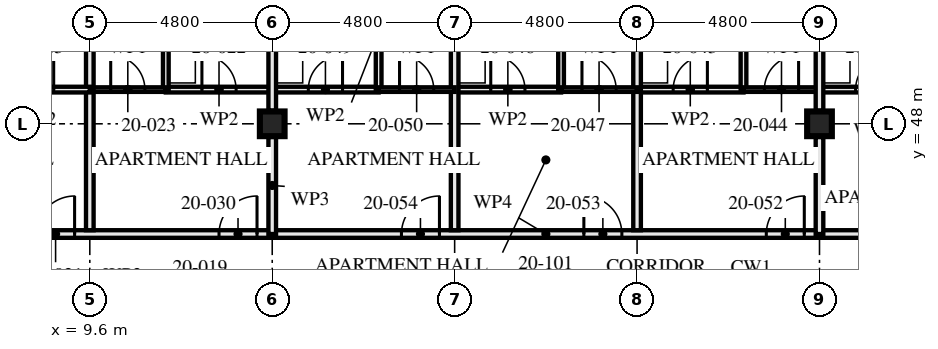
"""IFC4 building model, lengths in metres.
Left out: names, types, materials, properties, quantities, classifications, styles, units other than length and angle.
Written with IfcOpenShell. Run it as: python <this file> out.ifc"""

import sys

from ifc_helpers import new_model, si_unit, direction, frame, frame_2d, origin, origin_2d, place, context, subcontext, project, spatial, rectangle, hollow_rectangle, extrude, element, fill, save


model = new_model("IFC4")
c1 = context("Model", 3, precision=1e-05, world=origin(), true_north=direction((0.0, 1.0)))
c2 = subcontext(c1, "Body", "Model", "MODEL_VIEW")
j1 = project(units=[si_unit("LENGTHUNIT", "METRE"), si_unit("PLANEANGLEUNIT", "RADIAN")], contexts=[c1])
p1 = place(None, origin())
s1 = spatial("IfcSite", under=j1, at=p1, CompositionType="ELEMENT")
p2 = place(p1, origin())
s2 = spatial("IfcBuilding", under=s1, at=p2, CompositionType="ELEMENT")
p3 = place(p2, frame((0.0, 0.0, 76.0)))
s3 = spatial("IfcBuildingStorey", under=s2, at=p3, CompositionType="ELEMENT", Elevation=76.0)
for number, where, z_axis, x_axis in (
    (1, (14.4, 48.0, 0.0), (0.0, 0.0, 1.0), (1.0, 0.0, 0.0)),
    (2, (28.8, 48.0, 0.0), (0.0, 0.0, 1.0), (1.0, 0.0, 0.0)),
):
    element("IfcColumn", number, at=place(p3, frame(where, z_axis=z_axis, x_axis=x_axis)), inside=s3, PredefinedType="COLUMN", context=c2, shape_type="SweptSolid", body=[
        extrude(hollow_rectangle(XDim=0.65, YDim=0.65, WallThickness=0.05, at=origin_2d()), origin(), (0.0, 0.0, 1.0), 3.5),
    ])
p4 = place(p3, frame((11.6, 51.9, 0.0), z_axis=(0.0, 0.0, 1.0), x_axis=(0.0, -1.0, 0.0)))
e3 = element("IfcWall", 3, at=p4, inside=s3, PredefinedType="PARTITIONING", context=c2, shape_type="SweptSolid", body=[
    extrude(rectangle(XDim=3.0, YDim=0.15, at=frame_2d((1.5, 0.0))), origin(), (0.0, 0.0, 1.0), 3.25),
])
p5 = place(p3, frame((14.4, 48.9, 0.0), z_axis=(0.0, 0.0, 1.0), x_axis=(-1.0, 0.0, 0.0)))
e4 = element("IfcWall", 4, at=p5, inside=s3, PredefinedType="PARTITIONING", context=c2, shape_type="SweptSolid", body=[
    extrude(rectangle(XDim=2.8, YDim=0.15, at=frame_2d((1.4, 0.0))), origin(), (0.0, 0.0, 1.0), 3.25),
])
p6 = place(p5, frame((0.95, 0.0, 0.0)))
e5 = element("IfcOpeningElement", 5, at=p6, cuts=e4, PredefinedType="OPENING", context=c2, shape_type="SweptSolid", body=[
    extrude(rectangle(XDim=0.9, YDim=2.1, at=frame_2d((0.45, 1.05))), frame((0.0, 0.085, 0.0), z_axis=(0.0, -1.0, 0.0), x_axis=(1.0, 0.0, 0.0)), (0.0, 0.0, 1.0), 0.171),
])
p7 = place(p3, frame((11.6, 48.9, 0.0), z_axis=(0.0, 0.0, 1.0), x_axis=(-1.0, 0.0, 0.0)))
e6 = element("IfcWall", 6, at=p7, inside=s3, PredefinedType="PARTITIONING", context=c2, shape_type="SweptSolid", body=[
    extrude(rectangle(XDim=2.0, YDim=0.12, at=frame_2d((1.0, 0.0))), origin(), (0.0, 0.0, 1.0), 3.25),
])
p8 = place(p7, frame((0.55, 0.0, 0.0)))
e7 = element("IfcOpeningElement", 7, at=p8, cuts=e6, PredefinedType="OPENING", context=c2, shape_type="SweptSolid", body=[
    extrude(rectangle(XDim=0.9, YDim=2.1, at=frame_2d((0.45, 1.05))), frame((0.0, 0.071, 0.0), z_axis=(0.0, -1.0, 0.0), x_axis=(1.0, 0.0, 0.0)), (0.0, 0.0, 1.0), 0.141),
])
p9 = place(p3, frame((9.6, 57.28, 0.0), z_axis=(0.0, 0.0, 1.0), x_axis=(0.0, -1.0, 0.0)))
e8 = element("IfcWall", 8, at=p9, inside=s3, PredefinedType="PARTITIONING", context=c2, shape_type="SweptSolid", body=[
    extrude(rectangle(XDim=12.08, YDim=0.2, at=frame_2d((6.04, 0.0))), origin(), (0.0, 0.0, 1.0), 2.04),
])
p10 = place(p3, frame((9.6, 48.9, 0.0), z_axis=(0.0, 0.0, 1.0), x_axis=(-1.0, 0.0, 0.0)))
e9 = element("IfcWall", 9, at=p10, inside=s3, PredefinedType="PARTITIONING", context=c2, shape_type="SweptSolid", body=[
    extrude(rectangle(XDim=2.8, YDim=0.15, at=frame_2d((1.4, 0.0))), origin(), (0.0, 0.0, 1.0), 3.25),
])
p11 = place(p10, frame((0.95, 0.0, 0.0)))
e10 = element("IfcOpeningElement", 10, at=p11, cuts=e9, PredefinedType="OPENING", context=c2, shape_type="SweptSolid", body=[
    extrude(rectangle(XDim=0.9, YDim=2.1, at=frame_2d((0.45, 1.05))), frame((0.0, 0.085, 0.0), z_axis=(0.0, -1.0, 0.0), x_axis=(1.0, 0.0, 0.0)), (0.0, 0.0, 1.0), 0.171),
])
p12 = place(p3, frame((14.4, 45.1, 0.0), z_axis=(0.0, 0.0, 1.0), x_axis=(-1.0, 0.0, 0.0)))
e11 = element("IfcWall", 11, at=p12, inside=s3, PredefinedType="PARTITIONING", context=c2, shape_type="SweptSolid", body=[
    extrude(rectangle(XDim=9.6, YDim=0.2, at=frame_2d((4.8, 0.0))), origin(), (0.0, 0.0, 1.0), 3.25),
])
p13 = place(p12, frame((0.4, 0.0, 0.0)))
e12 = element("IfcOpeningElement", 12, at=p13, cuts=e11, PredefinedType="OPENING", context=c2, shape_type="SweptSolid", body=[
    extrude(rectangle(XDim=1.0, YDim=2.1, at=frame_2d((0.5, 1.05))), frame((0.0, 0.111, 0.0), z_axis=(0.0, -1.0, 0.0), x_axis=(1.0, 0.0, 0.0)), (0.0, 0.0, 1.0), 0.221),
])
p14 = place(p12, frame((5.2, 0.0, 0.0)))
e13 = element("IfcOpeningElement", 13, at=p14, cuts=e11, PredefinedType="OPENING", context=c2, shape_type="SweptSolid", body=[
    extrude(rectangle(XDim=1.0, YDim=2.1, at=frame_2d((0.5, 1.05))), frame((0.0, 0.111, 0.0), z_axis=(0.0, -1.0, 0.0), x_axis=(1.0, 0.0, 0.0)), (0.0, 0.0, 1.0), 0.221),
])
p15 = place(p3, frame((26.8, 51.9, 0.0), z_axis=(0.0, 0.0, 1.0), x_axis=(0.0, -1.0, 0.0)))
e14 = element("IfcWall", 14, at=p15, inside=s3, PredefinedType="PARTITIONING", context=c2, shape_type="SweptSolid", body=[
    extrude(rectangle(XDim=3.0, YDim=0.15, at=frame_2d((1.5, 0.0))), origin(), (0.0, 0.0, 1.0), 3.25),
])
p16 = place(p3, frame((26.8, 48.9, 0.0), z_axis=(0.0, 0.0, 1.0), x_axis=(-1.0, 0.0, 0.0)))
e15 = element("IfcWall", 15, at=p16, inside=s3, PredefinedType="PARTITIONING", context=c2, shape_type="SweptSolid", body=[
    extrude(rectangle(XDim=2.8, YDim=0.15, at=frame_2d((1.4, 0.0))), origin(), (0.0, 0.0, 1.0), 3.25),
])
p17 = place(p16, frame((0.95, 0.0, 0.0)))
e16 = element("IfcOpeningElement", 16, at=p17, cuts=e15, PredefinedType="OPENING", context=c2, shape_type="SweptSolid", body=[
    extrude(rectangle(XDim=0.9, YDim=2.1, at=frame_2d((0.45, 1.05))), frame((0.0, 0.085, 0.0), z_axis=(0.0, -1.0, 0.0), x_axis=(1.0, 0.0, 0.0)), (0.0, 0.0, 1.0), 0.171),
])
p18 = place(p3, frame((28.8, 48.9, 0.0), z_axis=(0.0, 0.0, 1.0), x_axis=(-1.0, 0.0, 0.0)))
e17 = element("IfcWall", 17, at=p18, inside=s3, PredefinedType="PARTITIONING", context=c2, shape_type="SweptSolid", body=[
    extrude(rectangle(XDim=2.0, YDim=0.12, at=frame_2d((1.0, 0.0))), origin(), (0.0, 0.0, 1.0), 3.25),
])
p19 = place(p18, frame((0.55, 0.0, 0.0)))
e18 = element("IfcOpeningElement", 18, at=p19, cuts=e17, PredefinedType="OPENING", context=c2, shape_type="SweptSolid", body=[
    extrude(rectangle(XDim=0.9, YDim=2.1, at=frame_2d((0.45, 1.05))), frame((0.0, 0.071, 0.0), z_axis=(0.0, -1.0, 0.0), x_axis=(1.0, 0.0, 0.0)), (0.0, 0.0, 1.0), 0.141),
])
p20 = place(p3, frame((24.0, 57.28, 0.0), z_axis=(0.0, 0.0, 1.0), x_axis=(0.0, -1.0, 0.0)))
e19 = element("IfcWall", 19, at=p20, inside=s3, PredefinedType="PARTITIONING", context=c2, shape_type="SweptSolid", body=[
    extrude(rectangle(XDim=12.08, YDim=0.2, at=frame_2d((6.04, 0.0))), origin(), (0.0, 0.0, 1.0), 2.04),
])
p21 = place(p3, frame((22.0, 51.9, 0.0), z_axis=(0.0, 0.0, 1.0), x_axis=(0.0, -1.0, 0.0)))
e20 = element("IfcWall", 20, at=p21, inside=s3, PredefinedType="PARTITIONING", context=c2, shape_type="SweptSolid", body=[
    extrude(rectangle(XDim=3.0, YDim=0.15, at=frame_2d((1.5, 0.0))), origin(), (0.0, 0.0, 1.0), 3.25),
])
p22 = place(p3, frame((22.0, 48.9, 0.0), z_axis=(0.0, 0.0, 1.0), x_axis=(-1.0, 0.0, 0.0)))
e21 = element("IfcWall", 21, at=p22, inside=s3, PredefinedType="PARTITIONING", context=c2, shape_type="SweptSolid", body=[
    extrude(rectangle(XDim=2.8, YDim=0.15, at=frame_2d((1.4, 0.0))), origin(), (0.0, 0.0, 1.0), 3.25),
])
p23 = place(p22, frame((0.95, 0.0, 0.0)))
e22 = element("IfcOpeningElement", 22, at=p23, cuts=e21, PredefinedType="OPENING", context=c2, shape_type="SweptSolid", body=[
    extrude(rectangle(XDim=0.9, YDim=2.1, at=frame_2d((0.45, 1.05))), frame((0.0, 0.085, 0.0), z_axis=(0.0, -1.0, 0.0), x_axis=(1.0, 0.0, 0.0)), (0.0, 0.0, 1.0), 0.171),
])
p24 = place(p3, frame((24.0, 48.9, 0.0), z_axis=(0.0, 0.0, 1.0), x_axis=(-1.0, 0.0, 0.0)))
e23 = element("IfcWall", 23, at=p24, inside=s3, PredefinedType="PARTITIONING", context=c2, shape_type="SweptSolid", body=[
    extrude(rectangle(XDim=2.0, YDim=0.12, at=frame_2d((1.0, 0.0))), origin(), (0.0, 0.0, 1.0), 3.25),
])
p25 = place(p24, frame((0.55, 0.0, 0.0)))
e24 = element("IfcOpeningElement", 24, at=p25, cuts=e23, PredefinedType="OPENING", context=c2, shape_type="SweptSolid", body=[
    extrude(rectangle(XDim=0.9, YDim=2.1, at=frame_2d((0.45, 1.05))), frame((0.0, 0.071, 0.0), z_axis=(0.0, -1.0, 0.0), x_axis=(1.0, 0.0, 0.0)), (0.0, 0.0, 1.0), 0.141),
])
p26 = place(p3, frame((19.2, 57.28, 0.0), z_axis=(0.0, 0.0, 1.0), x_axis=(0.0, -1.0, 0.0)))
e25 = element("IfcWall", 25, at=p26, inside=s3, PredefinedType="PARTITIONING", context=c2, shape_type="SweptSolid", body=[
    extrude(rectangle(XDim=12.08, YDim=0.2, at=frame_2d((6.04, 0.0))), origin(), (0.0, 0.0, 1.0), 2.04),
])
p27 = place(p3, frame((17.2, 51.9, 0.0), z_axis=(0.0, 0.0, 1.0), x_axis=(0.0, -1.0, 0.0)))
e26 = element("IfcWall", 26, at=p27, inside=s3, PredefinedType="PARTITIONING", context=c2, shape_type="SweptSolid", body=[
    extrude(rectangle(XDim=3.0, YDim=0.15, at=frame_2d((1.5, 0.0))), origin(), (0.0, 0.0, 1.0), 3.25),
])
p28 = place(p3, frame((17.2, 48.9, 0.0), z_axis=(0.0, 0.0, 1.0), x_axis=(-1.0, 0.0, 0.0)))
e27 = element("IfcWall", 27, at=p28, inside=s3, PredefinedType="PARTITIONING", context=c2, shape_type="SweptSolid", body=[
    extrude(rectangle(XDim=2.8, YDim=0.15, at=frame_2d((1.4, 0.0))), origin(), (0.0, 0.0, 1.0), 3.25),
])
p29 = place(p28, frame((0.95, 0.0, 0.0)))
e28 = element("IfcOpeningElement", 28, at=p29, cuts=e27, PredefinedType="OPENING", context=c2, shape_type="SweptSolid", body=[
    extrude(rectangle(XDim=0.9, YDim=2.1, at=frame_2d((0.45, 1.05))), frame((0.0, 0.085, 0.0), z_axis=(0.0, -1.0, 0.0), x_axis=(1.0, 0.0, 0.0)), (0.0, 0.0, 1.0), 0.171),
])
p30 = place(p3, frame((19.2, 48.9, 0.0), z_axis=(0.0, 0.0, 1.0), x_axis=(-1.0, 0.0, 0.0)))
e29 = element("IfcWall", 29, at=p30, inside=s3, PredefinedType="PARTITIONING", context=c2, shape_type="SweptSolid", body=[
    extrude(rectangle(XDim=2.0, YDim=0.12, at=frame_2d((1.0, 0.0))), origin(), (0.0, 0.0, 1.0), 3.25),
])
p31 = place(p30, frame((0.55, 0.0, 0.0)))
e30 = element("IfcOpeningElement", 30, at=p31, cuts=e29, PredefinedType="OPENING", context=c2, shape_type="SweptSolid", body=[
    extrude(rectangle(XDim=0.9, YDim=2.1, at=frame_2d((0.45, 1.05))), frame((0.0, 0.071, 0.0), z_axis=(0.0, -1.0, 0.0), x_axis=(1.0, 0.0, 0.0)), (0.0, 0.0, 1.0), 0.141),
])
p32 = place(p3, frame((28.8, 45.1, 0.0), z_axis=(0.0, 0.0, 1.0), x_axis=(-1.0, 0.0, 0.0)))
e31 = element("IfcWall", 31, at=p32, inside=s3, PredefinedType="PARTITIONING", context=c2, shape_type="SweptSolid", body=[
    extrude(rectangle(XDim=14.4, YDim=0.2, at=frame_2d((7.2, 0.0))), origin(), (0.0, 0.0, 1.0), 3.25),
])
p33 = place(p32, frame((0.4, 0.0, 0.0)))
e32 = element("IfcOpeningElement", 32, at=p33, cuts=e31, PredefinedType="OPENING", context=c2, shape_type="SweptSolid", body=[
    extrude(rectangle(XDim=1.0, YDim=2.1, at=frame_2d((0.5, 1.05))), frame((0.0, 0.111, 0.0), z_axis=(0.0, -1.0, 0.0), x_axis=(1.0, 0.0, 0.0)), (0.0, 0.0, 1.0), 0.221),
])
p34 = place(p32, frame((5.2, 0.0, 0.0)))
e33 = element("IfcOpeningElement", 33, at=p34, cuts=e31, PredefinedType="OPENING", context=c2, shape_type="SweptSolid", body=[
    extrude(rectangle(XDim=1.0, YDim=2.1, at=frame_2d((0.5, 1.05))), frame((0.0, 0.111, 0.0), z_axis=(0.0, -1.0, 0.0), x_axis=(1.0, 0.0, 0.0)), (0.0, 0.0, 1.0), 0.221),
])
p35 = place(p32, frame((10.0, 0.0, 0.0)))
e34 = element("IfcOpeningElement", 34, at=p35, cuts=e31, PredefinedType="OPENING", context=c2, shape_type="SweptSolid", body=[
    extrude(rectangle(XDim=1.0, YDim=2.1, at=frame_2d((0.5, 1.05))), frame((0.0, 0.111, 0.0), z_axis=(0.0, -1.0, 0.0), x_axis=(1.0, 0.0, 0.0)), (0.0, 0.0, 1.0), 0.221),
])
p36 = place(p3, frame((31.6, 48.9, 0.0), z_axis=(0.0, 0.0, 1.0), x_axis=(-1.0, 0.0, 0.0)))
e35 = element("IfcWall", 35, at=p36, inside=s3, PredefinedType="PARTITIONING", context=c2, shape_type="SweptSolid", body=[
    extrude(rectangle(XDim=2.8, YDim=0.15, at=frame_2d((1.4, 0.0))), origin(), (0.0, 0.0, 1.0), 3.25),
])
p37 = place(p36, frame((0.95, 0.0, 0.0)))
e36 = element("IfcOpeningElement", 36, at=p37, cuts=e35, PredefinedType="OPENING", context=c2, shape_type="SweptSolid", body=[
    extrude(rectangle(XDim=0.9, YDim=2.1, at=frame_2d((0.45, 1.05))), frame((0.0, 0.085, 0.0), z_axis=(0.0, -1.0, 0.0), x_axis=(1.0, 0.0, 0.0)), (0.0, 0.0, 1.0), 0.171),
])
p38 = place(p3, frame((38.4, 45.1, 0.0), z_axis=(0.0, 0.0, 1.0), x_axis=(-1.0, 0.0, 0.0)))
e37 = element("IfcWall", 37, at=p38, inside=s3, PredefinedType="PARTITIONING", context=c2, shape_type="SweptSolid", body=[
    extrude(rectangle(XDim=9.6, YDim=0.2, at=frame_2d((4.8, 0.0))), origin(), (0.0, 0.0, 1.0), 3.25),
])
p39 = place(p38, frame((0.4, 0.0, 0.0)))
e38 = element("IfcOpeningElement", 38, at=p39, cuts=e37, PredefinedType="OPENING", context=c2, shape_type="SweptSolid", body=[
    extrude(rectangle(XDim=1.0, YDim=2.1, at=frame_2d((0.5, 1.05))), frame((0.0, 0.111, 0.0), z_axis=(0.0, -1.0, 0.0), x_axis=(1.0, 0.0, 0.0)), (0.0, 0.0, 1.0), 0.221),
])
p40 = place(p38, frame((5.2, 0.0, 0.0)))
e39 = element("IfcOpeningElement", 39, at=p40, cuts=e37, PredefinedType="OPENING", context=c2, shape_type="SweptSolid", body=[
    extrude(rectangle(XDim=1.0, YDim=2.1, at=frame_2d((0.5, 1.05))), frame((0.0, 0.111, 0.0), z_axis=(0.0, -1.0, 0.0), x_axis=(1.0, 0.0, 0.0)), (0.0, 0.0, 1.0), 0.221),
])
p41 = place(p3, frame((14.4, 45.1, 0.0), z_axis=(0.0, 0.0, 1.0), x_axis=(0.0, 1.0, 0.0)))
e40 = element("IfcWall", 40, at=p41, inside=s3, PredefinedType="PARTITIONING", context=c2, shape_type="SweptSolid", body=[
    extrude(rectangle(XDim=2.555, YDim=0.2, at=frame_2d((1.277, 0.0))), origin(), (0.0, 0.0, 1.0), 2.04),
])
p42 = place(p3, frame((14.4, 48.345, 0.0), z_axis=(0.0, 0.0, 1.0), x_axis=(0.0, 1.0, 0.0)))
e41 = element("IfcWall", 41, at=p42, inside=s3, PredefinedType="PARTITIONING", context=c2, shape_type="SweptSolid", body=[
    extrude(rectangle(XDim=4.11, YDim=0.2, at=frame_2d((2.055, 0.0))), origin(), (0.0, 0.0, 1.0), 2.04),
])
p43 = place(p3, frame((28.8, 45.1, 0.0), z_axis=(0.0, 0.0, 1.0), x_axis=(0.0, 1.0, 0.0)))
e42 = element("IfcWall", 42, at=p43, inside=s3, PredefinedType="PARTITIONING", context=c2, shape_type="SweptSolid", body=[
    extrude(rectangle(XDim=2.555, YDim=0.2, at=frame_2d((1.277, 0.0))), origin(), (0.0, 0.0, 1.0), 2.04),
])
p44 = place(p3, frame((28.8, 48.345, 0.0), z_axis=(0.0, 0.0, 1.0), x_axis=(0.0, 1.0, 0.0)))
e43 = element("IfcWall", 43, at=p44, inside=s3, PredefinedType="PARTITIONING", context=c2, shape_type="SweptSolid", body=[
    extrude(rectangle(XDim=4.11, YDim=0.2, at=frame_2d((2.055, 0.0))), origin(), (0.0, 0.0, 1.0), 2.04),
])
p45 = place(p6, frame((0.9, 0.0, 0.0), z_axis=(0.0, 0.0, 1.0), x_axis=(-1.0, 0.0, 0.0)))
e44 = element("IfcDoor", 44, at=p45, inside=s3, OperationType="SINGLE_SWING_RIGHT", PredefinedType="DOOR", context=c2, shape_type="SweptSolid", body=[
    extrude(rectangle(XDim=0.9, YDim=2.1, at=frame_2d((0.45, 1.05))), frame((0.0, 0.022, 0.0), z_axis=(0.0, -1.0, 0.0), x_axis=(1.0, 0.0, 0.0)), (0.0, 0.0, 1.0), 0.044),
])
fill(e5, e44)
p46 = place(p8, frame((0.9, 0.0, 0.0), z_axis=(0.0, 0.0, 1.0), x_axis=(-1.0, 0.0, 0.0)))
e45 = element("IfcDoor", 45, at=p46, inside=s3, OperationType="SINGLE_SWING_RIGHT", PredefinedType="DOOR", context=c2, shape_type="SweptSolid", body=[
    extrude(rectangle(XDim=0.9, YDim=2.1, at=frame_2d((0.45, 1.05))), frame((0.0, 0.022, 0.0), z_axis=(0.0, -1.0, 0.0), x_axis=(1.0, 0.0, 0.0)), (0.0, 0.0, 1.0), 0.044),
])
fill(e7, e45)
p47 = place(p11, frame((0.9, 0.0, 0.0), z_axis=(0.0, 0.0, 1.0), x_axis=(-1.0, 0.0, 0.0)))
e46 = element("IfcDoor", 46, at=p47, inside=s3, OperationType="SINGLE_SWING_LEFT", PredefinedType="DOOR", context=c2, shape_type="SweptSolid", body=[
    extrude(rectangle(XDim=0.9, YDim=2.1, at=frame_2d((0.45, 1.05))), frame((0.0, 0.022, 0.0), z_axis=(0.0, -1.0, 0.0), x_axis=(1.0, 0.0, 0.0)), (0.0, 0.0, 1.0), 0.044),
])
fill(e10, e46)
p48 = place(p13, frame((1.0, 0.0, 0.0), z_axis=(0.0, 0.0, 1.0), x_axis=(-1.0, 0.0, 0.0)))
e47 = element("IfcDoor", 47, at=p48, inside=s3, OperationType="SINGLE_SWING_LEFT", PredefinedType="DOOR", context=c2, shape_type="SweptSolid", body=[
    extrude(rectangle(XDim=1.0, YDim=2.1, at=frame_2d((0.5, 1.05))), frame((0.0, 0.027, 0.0), z_axis=(0.0, -1.0, 0.0), x_axis=(1.0, 0.0, 0.0)), (0.0, 0.0, 1.0), 0.054),
])
fill(e12, e47)
p49 = place(p14, frame((1.0, 0.0, 0.0), z_axis=(0.0, 0.0, 1.0), x_axis=(-1.0, 0.0, 0.0)))
e48 = element("IfcDoor", 48, at=p49, inside=s3, OperationType="SINGLE_SWING_LEFT", PredefinedType="DOOR", context=c2, shape_type="SweptSolid", body=[
    extrude(rectangle(XDim=1.0, YDim=2.1, at=frame_2d((0.5, 1.05))), frame((0.0, 0.027, 0.0), z_axis=(0.0, -1.0, 0.0), x_axis=(1.0, 0.0, 0.0)), (0.0, 0.0, 1.0), 0.054),
])
fill(e13, e48)
p50 = place(p17, frame((0.9, 0.0, 0.0), z_axis=(0.0, 0.0, 1.0), x_axis=(-1.0, 0.0, 0.0)))
e49 = element("IfcDoor", 49, at=p50, inside=s3, OperationType="SINGLE_SWING_LEFT", PredefinedType="DOOR", context=c2, shape_type="SweptSolid", body=[
    extrude(rectangle(XDim=0.9, YDim=2.1, at=frame_2d((0.45, 1.05))), frame((0.0, 0.022, 0.0), z_axis=(0.0, -1.0, 0.0), x_axis=(1.0, 0.0, 0.0)), (0.0, 0.0, 1.0), 0.044),
])
fill(e16, e49)
p51 = place(p19, frame((0.9, 0.0, 0.0), z_axis=(0.0, 0.0, 1.0), x_axis=(-1.0, 0.0, 0.0)))
e50 = element("IfcDoor", 50, at=p51, inside=s3, OperationType="SINGLE_SWING_LEFT", PredefinedType="DOOR", context=c2, shape_type="SweptSolid", body=[
    extrude(rectangle(XDim=0.9, YDim=2.1, at=frame_2d((0.45, 1.05))), frame((0.0, 0.022, 0.0), z_axis=(0.0, -1.0, 0.0), x_axis=(1.0, 0.0, 0.0)), (0.0, 0.0, 1.0), 0.044),
])
fill(e18, e50)
p52 = place(p23, frame((0.9, 0.0, 0.0), z_axis=(0.0, 0.0, 1.0), x_axis=(-1.0, 0.0, 0.0)))
e51 = element("IfcDoor", 51, at=p52, inside=s3, OperationType="SINGLE_SWING_RIGHT", PredefinedType="DOOR", context=c2, shape_type="SweptSolid", body=[
    extrude(rectangle(XDim=0.9, YDim=2.1, at=frame_2d((0.45, 1.05))), frame((0.0, 0.022, 0.0), z_axis=(0.0, -1.0, 0.0), x_axis=(1.0, 0.0, 0.0)), (0.0, 0.0, 1.0), 0.044),
])
fill(e22, e51)
p53 = place(p25, frame((0.9, 0.0, 0.0), z_axis=(0.0, 0.0, 1.0), x_axis=(-1.0, 0.0, 0.0)))
e52 = element("IfcDoor", 52, at=p53, inside=s3, OperationType="SINGLE_SWING_RIGHT", PredefinedType="DOOR", context=c2, shape_type="SweptSolid", body=[
    extrude(rectangle(XDim=0.9, YDim=2.1, at=frame_2d((0.45, 1.05))), frame((0.0, 0.022, 0.0), z_axis=(0.0, -1.0, 0.0), x_axis=(1.0, 0.0, 0.0)), (0.0, 0.0, 1.0), 0.044),
])
fill(e24, e52)
p54 = place(p29, frame((0.9, 0.0, 0.0), z_axis=(0.0, 0.0, 1.0), x_axis=(-1.0, 0.0, 0.0)))
e53 = element("IfcDoor", 53, at=p54, inside=s3, OperationType="SINGLE_SWING_LEFT", PredefinedType="DOOR", context=c2, shape_type="SweptSolid", body=[
    extrude(rectangle(XDim=0.9, YDim=2.1, at=frame_2d((0.45, 1.05))), frame((0.0, 0.022, 0.0), z_axis=(0.0, -1.0, 0.0), x_axis=(1.0, 0.0, 0.0)), (0.0, 0.0, 1.0), 0.044),
])
fill(e28, e53)
p55 = place(p31, frame((0.9, 0.0, 0.0), z_axis=(0.0, 0.0, 1.0), x_axis=(-1.0, 0.0, 0.0)))
e54 = element("IfcDoor", 54, at=p55, inside=s3, OperationType="SINGLE_SWING_RIGHT", PredefinedType="DOOR", context=c2, shape_type="SweptSolid", body=[
    extrude(rectangle(XDim=0.9, YDim=2.1, at=frame_2d((0.45, 1.05))), frame((0.0, 0.022, 0.0), z_axis=(0.0, -1.0, 0.0), x_axis=(1.0, 0.0, 0.0)), (0.0, 0.0, 1.0), 0.044),
])
fill(e30, e54)
p56 = place(p33, frame((1.0, 0.0, 0.0), z_axis=(0.0, 0.0, 1.0), x_axis=(-1.0, 0.0, 0.0)))
e55 = element("IfcDoor", 55, at=p56, inside=s3, OperationType="SINGLE_SWING_LEFT", PredefinedType="DOOR", context=c2, shape_type="SweptSolid", body=[
    extrude(rectangle(XDim=1.0, YDim=2.1, at=frame_2d((0.5, 1.05))), frame((0.0, 0.027, 0.0), z_axis=(0.0, -1.0, 0.0), x_axis=(1.0, 0.0, 0.0)), (0.0, 0.0, 1.0), 0.054),
])
fill(e32, e55)
p57 = place(p34, frame((1.0, 0.0, 0.0), z_axis=(0.0, 0.0, 1.0), x_axis=(-1.0, 0.0, 0.0)))
e56 = element("IfcDoor", 56, at=p57, inside=s3, OperationType="SINGLE_SWING_RIGHT", PredefinedType="DOOR", context=c2, shape_type="SweptSolid", body=[
    extrude(rectangle(XDim=1.0, YDim=2.1, at=frame_2d((0.5, 1.05))), frame((0.0, 0.027, 0.0), z_axis=(0.0, -1.0, 0.0), x_axis=(1.0, 0.0, 0.0)), (0.0, 0.0, 1.0), 0.054),
])
fill(e33, e56)
p58 = place(p35, frame((1.0, 0.0, 0.0), z_axis=(0.0, 0.0, 1.0), x_axis=(-1.0, 0.0, 0.0)))
e57 = element("IfcDoor", 57, at=p58, inside=s3, OperationType="SINGLE_SWING_LEFT", PredefinedType="DOOR", context=c2, shape_type="SweptSolid", body=[
    extrude(rectangle(XDim=1.0, YDim=2.1, at=frame_2d((0.5, 1.05))), frame((0.0, 0.027, 0.0), z_axis=(0.0, -1.0, 0.0), x_axis=(1.0, 0.0, 0.0)), (0.0, 0.0, 1.0), 0.054),
])
fill(e34, e57)
p59 = place(p37, frame((0.9, 0.0, 0.0), z_axis=(0.0, 0.0, 1.0), x_axis=(-1.0, 0.0, 0.0)))
e58 = element("IfcDoor", 58, at=p59, inside=s3, OperationType="SINGLE_SWING_LEFT", PredefinedType="DOOR", context=c2, shape_type="SweptSolid", body=[
    extrude(rectangle(XDim=0.9, YDim=2.1, at=frame_2d((0.45, 1.05))), frame((0.0, 0.022, 0.0), z_axis=(0.0, -1.0, 0.0), x_axis=(1.0, 0.0, 0.0)), (0.0, 0.0, 1.0), 0.044),
])
fill(e36, e58)
save(model, sys.argv[1])
